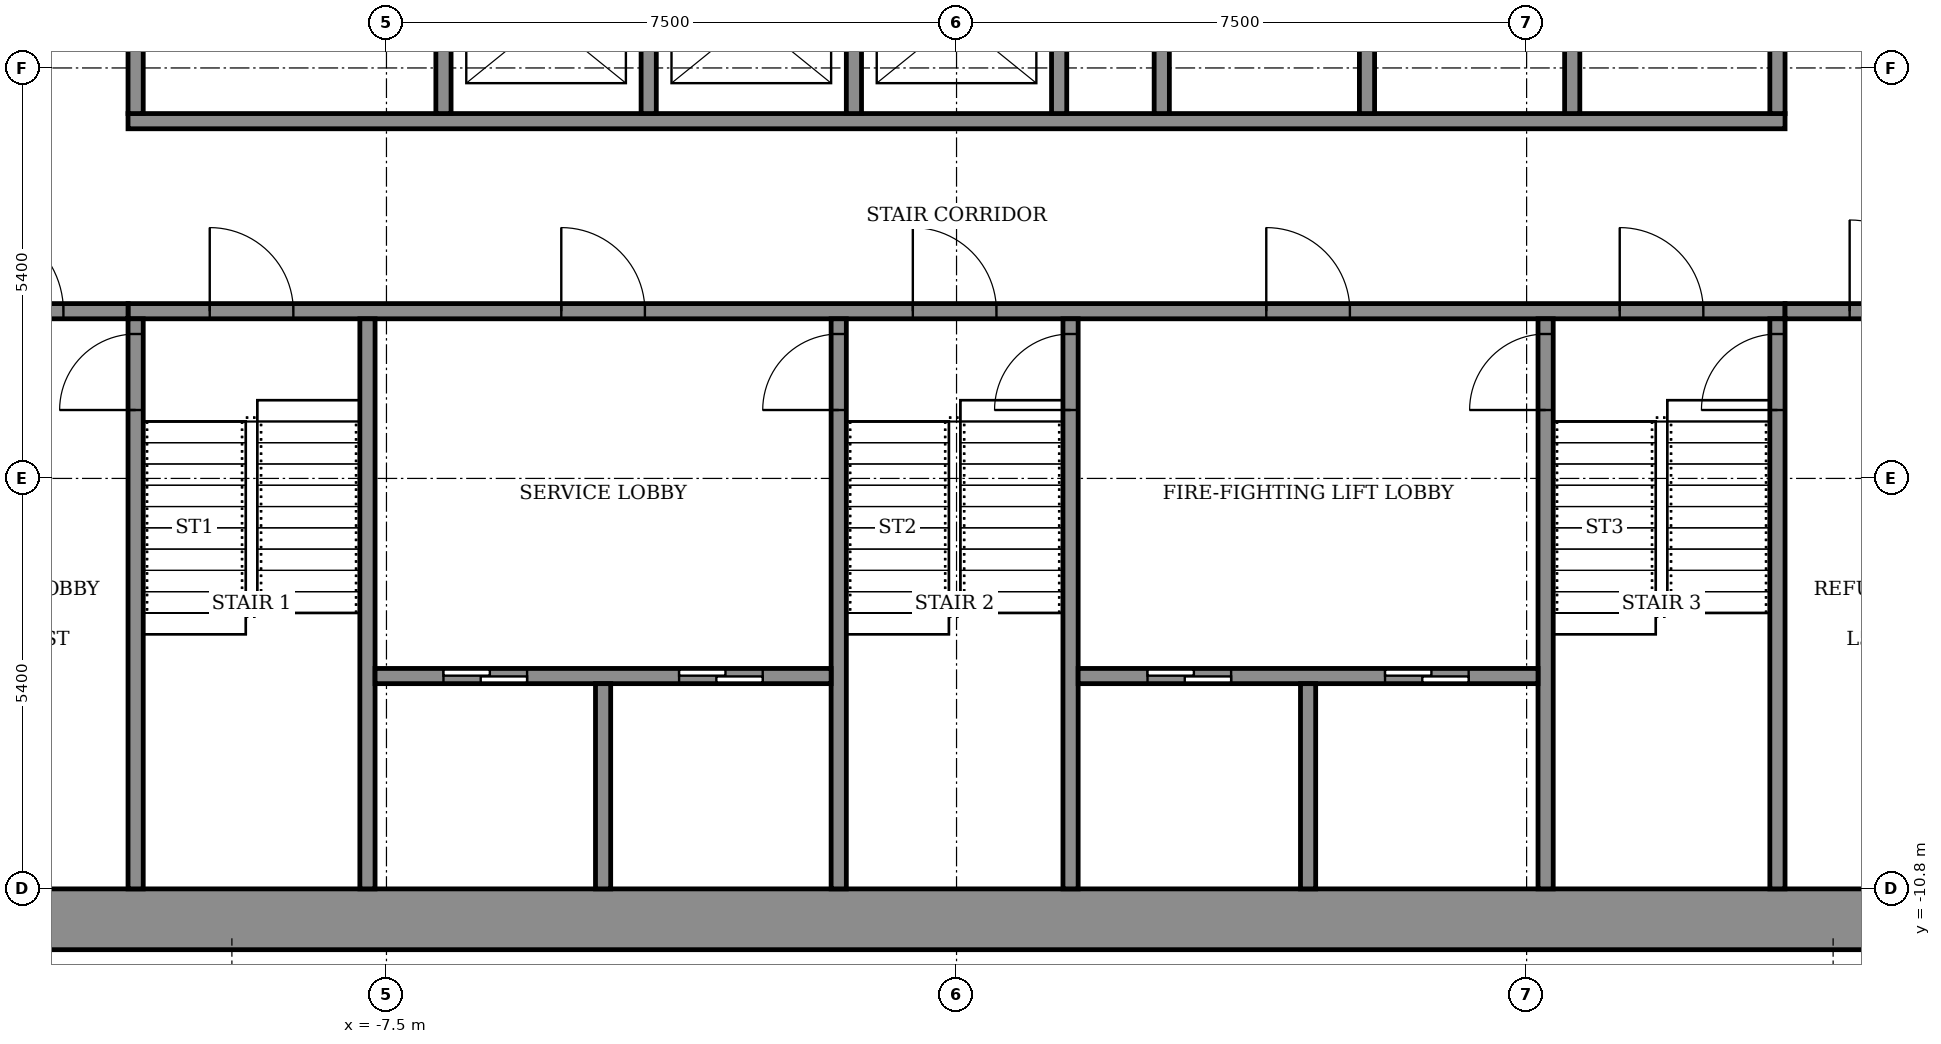
"""IFC4 building model, lengths in metres.
Left out: names, types, materials, properties, quantities, classifications, styles, units other than length and angle.
Written with IfcOpenShell. Run it as: python <this file> out.ifc"""

import sys

from ifc_helpers import new_model, si_unit, direction, frame, frame_2d, origin, place, context, subcontext, project, spatial, rectangle, extrude, element, fill, save


model = new_model("IFC4")
c1 = context("Model", 3, precision=1e-05, world=origin(), true_north=direction((0.0, 1.0)))
c2 = subcontext(c1, "Body", "Model", "MODEL_VIEW")
j1 = project(units=[si_unit("LENGTHUNIT", "METRE"), si_unit("PLANEANGLEUNIT", "RADIAN")], contexts=[c1])
p1 = place(None, origin())
s1 = spatial("IfcSite", under=j1, at=p1, CompositionType="ELEMENT")
p2 = place(p1, origin())
s2 = spatial("IfcBuilding", under=s1, at=p2, CompositionType="ELEMENT")
p3 = place(p2, frame((0.0, 0.0, 219.5)))
s3 = spatial("IfcBuildingStorey", under=s2, at=p3, CompositionType="ELEMENT", Elevation=219.5)
p4 = place(p3, frame((-14.6, -11.2, 0.0), z_axis=(0.0, 0.0, 1.0), x_axis=(1.0, 0.0, 0.0)))
e1 = element("IfcWall", 1, at=p4, inside=s3, PredefinedType="SHEAR", context=c2, shape_type="SweptSolid", body=[
    extrude(rectangle(XDim=29.2, YDim=0.8, at=frame_2d((14.6, 0.0))), origin(), (0.0, 0.0, 1.0), 7.0),
])
p5 = place(p3, frame((-10.9, -3.2, 0.0), z_axis=(0.0, 0.0, 1.0), x_axis=(1.0, 0.0, 0.0)))
e2 = element("IfcWall", 2, at=p5, inside=s3, PredefinedType="SHEAR", context=c2, shape_type="SweptSolid", body=[
    extrude(rectangle(XDim=21.8, YDim=0.2, at=frame_2d((10.9, 0.0))), origin(), (0.0, 0.0, 1.0), 6.45),
])
p6 = place(p5, frame((1.075, 0.0, 0.0)))
e3 = element("IfcOpeningElement", 3, at=p6, cuts=e2, PredefinedType="OPENING", context=c2, shape_type="SweptSolid", body=[
    extrude(rectangle(XDim=1.1, YDim=2.1, at=frame_2d((0.55, 1.05))), frame((0.0, 0.11, 0.0), z_axis=(0.0, -1.0, 0.0), x_axis=(1.0, 0.0, 0.0)), (0.0, 0.0, 1.0), 0.22),
])
p7 = place(p5, frame((10.325, 0.0, 0.0)))
e4 = element("IfcOpeningElement", 4, at=p7, cuts=e2, PredefinedType="OPENING", context=c2, shape_type="SweptSolid", body=[
    extrude(rectangle(XDim=1.1, YDim=2.1, at=frame_2d((0.55, 1.05))), frame((0.0, 0.11, 0.0), z_axis=(0.0, -1.0, 0.0), x_axis=(1.0, 0.0, 0.0)), (0.0, 0.0, 1.0), 0.22),
])
p8 = place(p5, frame((19.625, 0.0, 0.0)))
e5 = element("IfcOpeningElement", 5, at=p8, cuts=e2, PredefinedType="OPENING", context=c2, shape_type="SweptSolid", body=[
    extrude(rectangle(XDim=1.1, YDim=2.1, at=frame_2d((0.55, 1.05))), frame((0.0, 0.11, 0.0), z_axis=(0.0, -1.0, 0.0), x_axis=(1.0, 0.0, 0.0)), (0.0, 0.0, 1.0), 0.22),
])
p9 = place(p5, frame((5.7, 0.0, 0.0)))
e6 = element("IfcOpeningElement", 6, at=p9, cuts=e2, PredefinedType="OPENING", context=c2, shape_type="SweptSolid", body=[
    extrude(rectangle(XDim=1.1, YDim=2.1, at=frame_2d((0.55, 1.05))), frame((0.0, 0.11, 0.0), z_axis=(0.0, -1.0, 0.0), x_axis=(1.0, 0.0, 0.0)), (0.0, 0.0, 1.0), 0.22),
])
p10 = place(p5, frame((14.975, 0.0, 0.0)))
e7 = element("IfcOpeningElement", 7, at=p10, cuts=e2, PredefinedType="OPENING", context=c2, shape_type="SweptSolid", body=[
    extrude(rectangle(XDim=1.1, YDim=2.1, at=frame_2d((0.55, 1.05))), frame((0.0, 0.11, 0.0), z_axis=(0.0, -1.0, 0.0), x_axis=(1.0, 0.0, 0.0)), (0.0, 0.0, 1.0), 0.22),
])
p11 = place(p3, frame((-10.9, -0.7, 0.0), z_axis=(0.0, 0.0, 1.0), x_axis=(1.0, 0.0, 0.0)))
e8 = element("IfcWall", 8, at=p11, inside=s3, PredefinedType="SHEAR", context=c2, shape_type="SweptSolid", body=[
    extrude(rectangle(XDim=21.8, YDim=0.2, at=frame_2d((10.9, 0.0))), origin(), (0.0, 0.0, 1.0), 6.45),
])
p12 = place(p3, frame((-10.8, -10.8, 0.0), z_axis=(0.0, 0.0, 1.0), x_axis=(0.0, 1.0, 0.0)))
e9 = element("IfcWall", 9, at=p12, inside=s3, PredefinedType="SHEAR", context=c2, shape_type="SweptSolid", body=[
    extrude(rectangle(XDim=7.5, YDim=0.2, at=frame_2d((3.75, 0.0))), origin(), (0.0, 0.0, 1.0), 6.45),
])
p13 = place(p12, frame((6.3, 0.0, 0.0)))
e10 = element("IfcOpeningElement", 10, at=p13, cuts=e9, PredefinedType="OPENING", context=c2, shape_type="SweptSolid", body=[
    extrude(rectangle(XDim=1.0, YDim=2.1, at=frame_2d((0.5, 1.05))), frame((0.0, 0.11, 0.0), z_axis=(0.0, -1.0, 0.0), x_axis=(1.0, 0.0, 0.0)), (0.0, 0.0, 1.0), 0.22),
])
p14 = place(p3, frame((-7.75, -10.8, 0.0), z_axis=(0.0, 0.0, 1.0), x_axis=(0.0, 1.0, 0.0)))
e11 = element("IfcWall", 11, at=p14, inside=s3, PredefinedType="SHEAR", context=c2, shape_type="SweptSolid", body=[
    extrude(rectangle(XDim=7.5, YDim=0.2, at=frame_2d((3.75, 0.0))), origin(), (0.0, 0.0, 1.0), 6.45),
])
p15 = place(p3, frame((-1.55, -10.8, 0.0), z_axis=(0.0, 0.0, 1.0), x_axis=(0.0, 1.0, 0.0)))
e12 = element("IfcWall", 12, at=p15, inside=s3, PredefinedType="SHEAR", context=c2, shape_type="SweptSolid", body=[
    extrude(rectangle(XDim=7.5, YDim=0.2, at=frame_2d((3.75, 0.0))), origin(), (0.0, 0.0, 1.0), 6.45),
])
p16 = place(p15, frame((6.3, 0.0, 0.0)))
e13 = element("IfcOpeningElement", 13, at=p16, cuts=e12, PredefinedType="OPENING", context=c2, shape_type="SweptSolid", body=[
    extrude(rectangle(XDim=1.0, YDim=2.1, at=frame_2d((0.5, 1.05))), frame((0.0, 0.11, 0.0), z_axis=(0.0, -1.0, 0.0), x_axis=(1.0, 0.0, 0.0)), (0.0, 0.0, 1.0), 0.22),
])
p17 = place(p3, frame((1.5, -10.8, 0.0), z_axis=(0.0, 0.0, 1.0), x_axis=(0.0, 1.0, 0.0)))
e14 = element("IfcWall", 14, at=p17, inside=s3, PredefinedType="SHEAR", context=c2, shape_type="SweptSolid", body=[
    extrude(rectangle(XDim=7.5, YDim=0.2, at=frame_2d((3.75, 0.0))), origin(), (0.0, 0.0, 1.0), 6.45),
])
p18 = place(p17, frame((6.3, 0.0, 0.0)))
e15 = element("IfcOpeningElement", 15, at=p18, cuts=e14, PredefinedType="OPENING", context=c2, shape_type="SweptSolid", body=[
    extrude(rectangle(XDim=1.0, YDim=2.1, at=frame_2d((0.5, 1.05))), frame((0.0, 0.11, 0.0), z_axis=(0.0, -1.0, 0.0), x_axis=(1.0, 0.0, 0.0)), (0.0, 0.0, 1.0), 0.22),
])
p19 = place(p3, frame((7.75, -10.8, 0.0), z_axis=(0.0, 0.0, 1.0), x_axis=(0.0, 1.0, 0.0)))
e16 = element("IfcWall", 16, at=p19, inside=s3, PredefinedType="SHEAR", context=c2, shape_type="SweptSolid", body=[
    extrude(rectangle(XDim=7.5, YDim=0.2, at=frame_2d((3.75, 0.0))), origin(), (0.0, 0.0, 1.0), 6.45),
])
p20 = place(p19, frame((6.3, 0.0, 0.0)))
e17 = element("IfcOpeningElement", 17, at=p20, cuts=e16, PredefinedType="OPENING", context=c2, shape_type="SweptSolid", body=[
    extrude(rectangle(XDim=1.0, YDim=2.1, at=frame_2d((0.5, 1.05))), frame((0.0, 0.11, 0.0), z_axis=(0.0, -1.0, 0.0), x_axis=(1.0, 0.0, 0.0)), (0.0, 0.0, 1.0), 0.22),
])
p21 = place(p3, frame((10.8, -10.8, 0.0), z_axis=(0.0, 0.0, 1.0), x_axis=(0.0, 1.0, 0.0)))
e18 = element("IfcWall", 18, at=p21, inside=s3, PredefinedType="SHEAR", context=c2, shape_type="SweptSolid", body=[
    extrude(rectangle(XDim=7.5, YDim=0.2, at=frame_2d((3.75, 0.0))), origin(), (0.0, 0.0, 1.0), 6.45),
])
p22 = place(p21, frame((6.3, 0.0, 0.0)))
e19 = element("IfcOpeningElement", 19, at=p22, cuts=e18, PredefinedType="OPENING", context=c2, shape_type="SweptSolid", body=[
    extrude(rectangle(XDim=1.0, YDim=2.1, at=frame_2d((0.5, 1.05))), frame((0.0, 0.11, 0.0), z_axis=(0.0, -1.0, 0.0), x_axis=(1.0, 0.0, 0.0)), (0.0, 0.0, 1.0), 0.22),
])
p23 = place(p3, frame((-7.65, -8.0, 0.0), z_axis=(0.0, 0.0, 1.0), x_axis=(1.0, 0.0, 0.0)))
e20 = element("IfcWall", 20, at=p23, inside=s3, PredefinedType="SHEAR", context=c2, shape_type="SweptSolid", body=[
    extrude(rectangle(XDim=6.0, YDim=0.2, at=frame_2d((3.0, 0.0))), origin(), (0.0, 0.0, 1.0), 6.45),
])
p24 = place(p23, frame((0.9, 0.0, 0.0)))
e21 = element("IfcOpeningElement", 21, at=p24, cuts=e20, PredefinedType="OPENING", context=c2, shape_type="SweptSolid", body=[
    extrude(rectangle(XDim=1.1, YDim=2.1, at=frame_2d((0.55, 1.05))), frame((0.0, 0.11, 0.0), z_axis=(0.0, -1.0, 0.0), x_axis=(1.0, 0.0, 0.0)), (0.0, 0.0, 1.0), 0.22),
])
p25 = place(p23, frame((4.0, 0.0, 0.0)))
e22 = element("IfcOpeningElement", 22, at=p25, cuts=e20, PredefinedType="OPENING", context=c2, shape_type="SweptSolid", body=[
    extrude(rectangle(XDim=1.1, YDim=2.1, at=frame_2d((0.55, 1.05))), frame((0.0, 0.11, 0.0), z_axis=(0.0, -1.0, 0.0), x_axis=(1.0, 0.0, 0.0)), (0.0, 0.0, 1.0), 0.22),
])
p26 = place(p3, frame((-4.65, -10.8, 0.0), z_axis=(0.0, 0.0, 1.0), x_axis=(0.0, 1.0, 0.0)))
e23 = element("IfcWall", 23, at=p26, inside=s3, PredefinedType="SHEAR", context=c2, shape_type="SweptSolid", body=[
    extrude(rectangle(XDim=2.7, YDim=0.2, at=frame_2d((1.35, 0.0))), origin(), (0.0, 0.0, 1.0), 6.45),
])
p27 = place(p3, frame((1.6, -8.0, 0.0), z_axis=(0.0, 0.0, 1.0), x_axis=(1.0, 0.0, 0.0)))
e24 = element("IfcWall", 24, at=p27, inside=s3, PredefinedType="SHEAR", context=c2, shape_type="SweptSolid", body=[
    extrude(rectangle(XDim=6.05, YDim=0.2, at=frame_2d((3.025, 0.0))), origin(), (0.0, 0.0, 1.0), 6.45),
])
p28 = place(p27, frame((0.913, 0.0, 0.0)))
e25 = element("IfcOpeningElement", 25, at=p28, cuts=e24, PredefinedType="OPENING", context=c2, shape_type="SweptSolid", body=[
    extrude(rectangle(XDim=1.1, YDim=2.1, at=frame_2d((0.55, 1.05))), frame((0.0, 0.11, 0.0), z_axis=(0.0, -1.0, 0.0), x_axis=(1.0, 0.0, 0.0)), (0.0, 0.0, 1.0), 0.22),
])
p29 = place(p27, frame((4.038, 0.0, 0.0)))
e26 = element("IfcOpeningElement", 26, at=p29, cuts=e24, PredefinedType="OPENING", context=c2, shape_type="SweptSolid", body=[
    extrude(rectangle(XDim=1.1, YDim=2.1, at=frame_2d((0.55, 1.05))), frame((0.0, 0.11, 0.0), z_axis=(0.0, -1.0, 0.0), x_axis=(1.0, 0.0, 0.0)), (0.0, 0.0, 1.0), 0.22),
])
p30 = place(p3, frame((4.625, -10.8, 0.0), z_axis=(0.0, 0.0, 1.0), x_axis=(0.0, 1.0, 0.0)))
e27 = element("IfcWall", 27, at=p30, inside=s3, PredefinedType="SHEAR", context=c2, shape_type="SweptSolid", body=[
    extrude(rectangle(XDim=2.7, YDim=0.2, at=frame_2d((1.35, 0.0))), origin(), (0.0, 0.0, 1.0), 6.45),
])
p31 = place(p3, frame((-10.8, -0.6, 0.0), z_axis=(0.0, 0.0, 1.0), x_axis=(0.0, 1.0, 0.0)))
e28 = element("IfcWall", 28, at=p31, inside=s3, PredefinedType="STANDARD", context=c2, shape_type="SweptSolid", body=[
    extrude(rectangle(XDim=2.5, YDim=0.2, at=frame_2d((1.25, 0.0))), origin(), (0.0, 0.0, 1.0), 6.45),
])
for number, where, z_axis, x_axis in (
    (29, (-6.75, -0.6, 0.0), (0.0, 0.0, 1.0), (0.0, 1.0, 0.0)),
    (30, (-4.05, -0.6, 0.0), (0.0, 0.0, 1.0), (0.0, 1.0, 0.0)),
    (31, (-1.35, -0.6, 0.0), (0.0, 0.0, 1.0), (0.0, 1.0, 0.0)),
    (32, (1.35, -0.6, 0.0), (0.0, 0.0, 1.0), (0.0, 1.0, 0.0)),
    (33, (2.7, -0.6, 0.0), (0.0, 0.0, 1.0), (0.0, 1.0, 0.0)),
    (34, (5.4, -0.6, 0.0), (0.0, 0.0, 1.0), (0.0, 1.0, 0.0)),
    (35, (8.1, -0.6, 0.0), (0.0, 0.0, 1.0), (0.0, 1.0, 0.0)),
    (36, (10.8, -0.6, 0.0), (0.0, 0.0, 1.0), (0.0, 1.0, 0.0)),
):
    element("IfcWall", number, at=place(p3, frame(where, z_axis=z_axis, x_axis=x_axis)), inside=s3, PredefinedType="SHEAR", context=c2, shape_type="SweptSolid", body=[
        extrude(rectangle(XDim=2.5, YDim=0.2, at=frame_2d((1.25, 0.0))), origin(), (0.0, 0.0, 1.0), 6.45),
    ])
p32 = place(p3, frame((-13.8, -3.2, 0.0), z_axis=(0.0, 0.0, 1.0), x_axis=(1.0, 0.0, 0.0)))
e37 = element("IfcWall", 37, at=p32, inside=s3, PredefinedType="STANDARD", context=c2, shape_type="SweptSolid", body=[
    extrude(rectangle(XDim=2.9, YDim=0.2, at=frame_2d((1.45, 0.0))), origin(), (0.0, 0.0, 1.0), 6.45),
])
p33 = place(p32, frame((0.85, 0.0, 0.0)))
e38 = element("IfcOpeningElement", 38, at=p33, cuts=e37, PredefinedType="OPENING", context=c2, shape_type="SweptSolid", body=[
    extrude(rectangle(XDim=1.2, YDim=2.1, at=frame_2d((0.6, 1.05))), frame((0.0, 0.11, 0.0), z_axis=(0.0, -1.0, 0.0), x_axis=(1.0, 0.0, 0.0)), (0.0, 0.0, 1.0), 0.22),
])
p34 = place(p3, frame((10.9, -3.2, 0.0), z_axis=(0.0, 0.0, 1.0), x_axis=(1.0, 0.0, 0.0)))
e39 = element("IfcWall", 39, at=p34, inside=s3, PredefinedType="STANDARD", context=c2, shape_type="SweptSolid", body=[
    extrude(rectangle(XDim=2.9, YDim=0.2, at=frame_2d((1.45, 0.0))), origin(), (0.0, 0.0, 1.0), 6.45),
])
p35 = place(p34, frame((0.85, 0.0, 0.0)))
e40 = element("IfcOpeningElement", 40, at=p35, cuts=e39, PredefinedType="OPENING", context=c2, shape_type="SweptSolid", body=[
    extrude(rectangle(XDim=1.2, YDim=2.1, at=frame_2d((0.6, 1.05))), frame((0.0, 0.11, 0.0), z_axis=(0.0, -1.0, 0.0), x_axis=(1.0, 0.0, 0.0)), (0.0, 0.0, 1.0), 0.22),
])
p36 = place(p28, origin())
e41 = element("IfcDoor", 41, at=p36, inside=s3, OperationType="SLIDING_TO_LEFT", PredefinedType="DOOR", context=c2, shape_type="SweptSolid", body=[
    extrude(rectangle(XDim=1.1, YDim=2.1, at=frame_2d((0.55, 1.05))), frame((0.0, 0.025, 0.0), z_axis=(0.0, -1.0, 0.0), x_axis=(1.0, 0.0, 0.0)), (0.0, 0.0, 1.0), 0.05),
])
fill(e25, e41)
p37 = place(p24, origin())
e42 = element("IfcDoor", 42, at=p37, inside=s3, OperationType="SLIDING_TO_LEFT", PredefinedType="DOOR", context=c2, shape_type="SweptSolid", body=[
    extrude(rectangle(XDim=1.1, YDim=2.1, at=frame_2d((0.55, 1.05))), frame((0.0, 0.025, 0.0), z_axis=(0.0, -1.0, 0.0), x_axis=(1.0, 0.0, 0.0)), (0.0, 0.0, 1.0), 0.05),
])
fill(e21, e42)
p38 = place(p29, origin())
e43 = element("IfcDoor", 43, at=p38, inside=s3, OperationType="SLIDING_TO_LEFT", PredefinedType="DOOR", context=c2, shape_type="SweptSolid", body=[
    extrude(rectangle(XDim=1.1, YDim=2.1, at=frame_2d((0.55, 1.05))), frame((0.0, 0.025, 0.0), z_axis=(0.0, -1.0, 0.0), x_axis=(1.0, 0.0, 0.0)), (0.0, 0.0, 1.0), 0.05),
])
fill(e26, e43)
p39 = place(p25, origin())
e44 = element("IfcDoor", 44, at=p39, inside=s3, OperationType="SLIDING_TO_LEFT", PredefinedType="DOOR", context=c2, shape_type="SweptSolid", body=[
    extrude(rectangle(XDim=1.1, YDim=2.1, at=frame_2d((0.55, 1.05))), frame((0.0, 0.025, 0.0), z_axis=(0.0, -1.0, 0.0), x_axis=(1.0, 0.0, 0.0)), (0.0, 0.0, 1.0), 0.05),
])
fill(e22, e44)
p40 = place(p6, origin())
e45 = element("IfcDoor", 45, at=p40, inside=s3, OperationType="SINGLE_SWING_RIGHT", PredefinedType="DOOR", context=c2, shape_type="SweptSolid", body=[
    extrude(rectangle(XDim=1.1, YDim=2.1, at=frame_2d((0.55, 1.05))), frame((0.0, 0.025, 0.0), z_axis=(0.0, -1.0, 0.0), x_axis=(1.0, 0.0, 0.0)), (0.0, 0.0, 1.0), 0.05),
])
fill(e3, e45)
p41 = place(p7, origin())
e46 = element("IfcDoor", 46, at=p41, inside=s3, OperationType="SINGLE_SWING_RIGHT", PredefinedType="DOOR", context=c2, shape_type="SweptSolid", body=[
    extrude(rectangle(XDim=1.1, YDim=2.1, at=frame_2d((0.55, 1.05))), frame((0.0, 0.025, 0.0), z_axis=(0.0, -1.0, 0.0), x_axis=(1.0, 0.0, 0.0)), (0.0, 0.0, 1.0), 0.05),
])
fill(e4, e46)
p42 = place(p8, origin())
e47 = element("IfcDoor", 47, at=p42, inside=s3, OperationType="SINGLE_SWING_RIGHT", PredefinedType="DOOR", context=c2, shape_type="SweptSolid", body=[
    extrude(rectangle(XDim=1.1, YDim=2.1, at=frame_2d((0.55, 1.05))), frame((0.0, 0.025, 0.0), z_axis=(0.0, -1.0, 0.0), x_axis=(1.0, 0.0, 0.0)), (0.0, 0.0, 1.0), 0.05),
])
fill(e5, e47)
p43 = place(p9, origin())
e48 = element("IfcDoor", 48, at=p43, inside=s3, OperationType="SINGLE_SWING_LEFT", PredefinedType="DOOR", context=c2, shape_type="SweptSolid", body=[
    extrude(rectangle(XDim=1.1, YDim=2.1, at=frame_2d((0.55, 1.05))), frame((0.0, 0.025, 0.0), z_axis=(0.0, -1.0, 0.0), x_axis=(1.0, 0.0, 0.0)), (0.0, 0.0, 1.0), 0.05),
])
fill(e6, e48)
p44 = place(p10, origin())
e49 = element("IfcDoor", 49, at=p44, inside=s3, OperationType="SINGLE_SWING_LEFT", PredefinedType="DOOR", context=c2, shape_type="SweptSolid", body=[
    extrude(rectangle(XDim=1.1, YDim=2.1, at=frame_2d((0.55, 1.05))), frame((0.0, 0.025, 0.0), z_axis=(0.0, -1.0, 0.0), x_axis=(1.0, 0.0, 0.0)), (0.0, 0.0, 1.0), 0.05),
])
fill(e7, e49)
p45 = place(p16, origin())
e50 = element("IfcDoor", 50, at=p45, inside=s3, OperationType="SINGLE_SWING_RIGHT", PredefinedType="DOOR", context=c2, shape_type="SweptSolid", body=[
    extrude(rectangle(XDim=1.0, YDim=2.1, at=frame_2d((0.5, 1.05))), frame((0.0, 0.025, 0.0), z_axis=(0.0, -1.0, 0.0), x_axis=(1.0, 0.0, 0.0)), (0.0, 0.0, 1.0), 0.05),
])
fill(e13, e50)
p46 = place(p18, origin())
e51 = element("IfcDoor", 51, at=p46, inside=s3, OperationType="SINGLE_SWING_RIGHT", PredefinedType="DOOR", context=c2, shape_type="SweptSolid", body=[
    extrude(rectangle(XDim=1.0, YDim=2.1, at=frame_2d((0.5, 1.05))), frame((0.0, 0.025, 0.0), z_axis=(0.0, -1.0, 0.0), x_axis=(1.0, 0.0, 0.0)), (0.0, 0.0, 1.0), 0.05),
])
fill(e15, e51)
p47 = place(p20, origin())
e52 = element("IfcDoor", 52, at=p47, inside=s3, OperationType="SINGLE_SWING_RIGHT", PredefinedType="DOOR", context=c2, shape_type="SweptSolid", body=[
    extrude(rectangle(XDim=1.0, YDim=2.1, at=frame_2d((0.5, 1.05))), frame((0.0, 0.025, 0.0), z_axis=(0.0, -1.0, 0.0), x_axis=(1.0, 0.0, 0.0)), (0.0, 0.0, 1.0), 0.05),
])
fill(e17, e52)
p48 = place(p33, origin())
e53 = element("IfcDoor", 53, at=p48, inside=s3, OperationType="SINGLE_SWING_LEFT", PredefinedType="DOOR", context=c2, shape_type="SweptSolid", body=[
    extrude(rectangle(XDim=1.2, YDim=2.1, at=frame_2d((0.6, 1.05))), frame((0.0, 0.025, 0.0), z_axis=(0.0, -1.0, 0.0), x_axis=(1.0, 0.0, 0.0)), (0.0, 0.0, 1.0), 0.05),
])
fill(e38, e53)
p49 = place(p13, origin())
e54 = element("IfcDoor", 54, at=p49, inside=s3, OperationType="SINGLE_SWING_RIGHT", PredefinedType="DOOR", context=c2, shape_type="SweptSolid", body=[
    extrude(rectangle(XDim=1.0, YDim=2.1, at=frame_2d((0.5, 1.05))), frame((0.0, 0.025, 0.0), z_axis=(0.0, -1.0, 0.0), x_axis=(1.0, 0.0, 0.0)), (0.0, 0.0, 1.0), 0.05),
])
fill(e10, e54)
p50 = place(p35, origin())
e55 = element("IfcDoor", 55, at=p50, inside=s3, OperationType="SINGLE_SWING_LEFT", PredefinedType="DOOR", context=c2, shape_type="SweptSolid", body=[
    extrude(rectangle(XDim=1.2, YDim=2.1, at=frame_2d((0.6, 1.05))), frame((0.0, 0.025, 0.0), z_axis=(0.0, -1.0, 0.0), x_axis=(1.0, 0.0, 0.0)), (0.0, 0.0, 1.0), 0.05),
])
fill(e40, e55)
p51 = place(p22, origin())
e56 = element("IfcDoor", 56, at=p51, inside=s3, OperationType="SINGLE_SWING_RIGHT", PredefinedType="DOOR", context=c2, shape_type="SweptSolid", body=[
    extrude(rectangle(XDim=1.0, YDim=2.1, at=frame_2d((0.5, 1.05))), frame((0.0, 0.025, 0.0), z_axis=(0.0, -1.0, 0.0), x_axis=(1.0, 0.0, 0.0)), (0.0, 0.0, 1.0), 0.05),
])
fill(e19, e56)
save(model, sys.argv[1])
